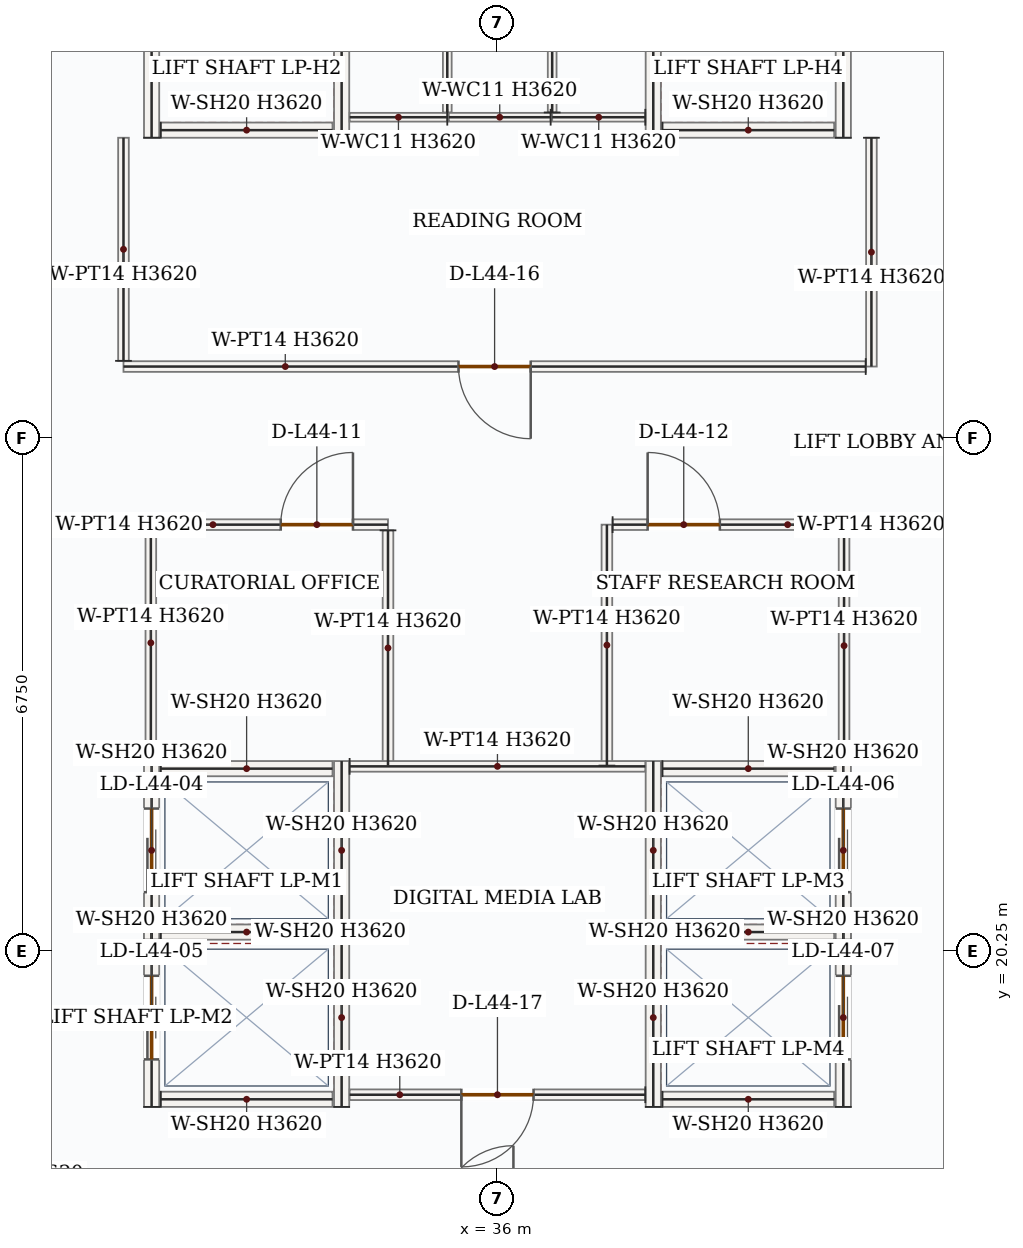
"""IFC4 building model, lengths in metres.
Left out: names, types, materials, properties, quantities, classifications, styles, units other than length and angle.
Written with IfcOpenShell. Run it as: python <this file> out.ifc"""

import sys

from ifc_helpers import new_model, si_unit, direction, frame, frame_2d, origin, place, context, subcontext, project, spatial, rectangle, extrude, source, transform, mapped, element, fill, save


model = new_model("IFC4")
c1 = context("Model", 3, precision=1e-05, world=origin(), true_north=direction((0.0, 1.0)))
c2 = subcontext(c1, "Body", "Model", "MODEL_VIEW")
j1 = project(units=[si_unit("LENGTHUNIT", "METRE"), si_unit("PLANEANGLEUNIT", "RADIAN")], contexts=[c1])
p1 = place(None, origin())
s1 = spatial("IfcSite", under=j1, at=p1, CompositionType="ELEMENT")
p2 = place(p1, origin())
s2 = spatial("IfcBuilding", under=s1, at=p2, CompositionType="ELEMENT")
p3 = place(p2, frame((0.0, 0.0, 190.2)))
s3 = spatial("IfcBuildingStorey", under=s2, at=p3, CompositionType="ELEMENT", Elevation=190.2)
m1 = source(origin(), c2, "Body", "SweptSolid", [
    extrude(rectangle(XDim=2.4, YDim=0.2, at=frame_2d((1.2, 0.0))), origin(), (0.0, 0.0, 1.0), 3.62),
])
for number, where, z_axis, x_axis in (
    (1, (31.45, 30.95, 0.0), (0.0, 0.0, 1.0), (0.0, 1.0, 0.0)),
    (2, (33.95, 30.95, 0.0), (0.0, 0.0, 1.0), (0.0, 1.0, 0.0)),
):
    element("IfcWall", number, at=place(p3, frame(where, z_axis=z_axis, x_axis=x_axis)), inside=s3, PredefinedType="SOLIDWALL", context=c2, shape_type="MappedRepresentation", body=[
        mapped(m1, transform((0.0, 0.0, 0.0), x_axis=(1.0, 0.0, 0.0), y_axis=(0.0, 1.0, 0.0), z_axis=(0.0, 0.0, 1.0), scale=1.0)),
    ])
m2 = source(origin(), c2, "Body", "SweptSolid", [
    extrude(rectangle(XDim=2.26, YDim=0.2, at=frame_2d((1.13, 0.0))), origin(), (0.0, 0.0, 1.0), 3.62),
])
p4 = place(p3, frame((31.57, 31.05, 0.0), z_axis=(0.0, 0.0, 1.0), x_axis=(1.0, 0.0, 0.0)))
e3 = element("IfcWall", 3, at=p4, inside=s3, PredefinedType="SOLIDWALL", context=c2, shape_type="MappedRepresentation", body=[
    mapped(m2, transform((0.0, 0.0, 0.0), x_axis=(1.0, 0.0, 0.0), y_axis=(0.0, 1.0, 0.0), z_axis=(0.0, 0.0, 1.0), scale=1.0)),
])
for number, where, z_axis, x_axis in (
    (4, (38.05, 30.95, 0.0), (0.0, 0.0, 1.0), (0.0, 1.0, 0.0)),
    (5, (40.55, 30.95, 0.0), (0.0, 0.0, 1.0), (0.0, 1.0, 0.0)),
):
    element("IfcWall", number, at=place(p3, frame(where, z_axis=z_axis, x_axis=x_axis)), inside=s3, PredefinedType="SOLIDWALL", context=c2, shape_type="MappedRepresentation", body=[
        mapped(m1, transform((0.0, 0.0, 0.0), x_axis=(1.0, 0.0, 0.0), y_axis=(0.0, 1.0, 0.0), z_axis=(0.0, 0.0, 1.0), scale=1.0)),
    ])
p5 = place(p3, frame((38.17, 31.05, 0.0), z_axis=(0.0, 0.0, 1.0), x_axis=(1.0, 0.0, 0.0)))
e6 = element("IfcWall", 6, at=p5, inside=s3, PredefinedType="SOLIDWALL", context=c2, shape_type="MappedRepresentation", body=[
    mapped(m2, transform((0.0, 0.0, 0.0), x_axis=(1.0, 0.0, 0.0), y_axis=(0.0, 1.0, 0.0), z_axis=(0.0, 0.0, 1.0), scale=1.0)),
])
p6 = place(p3, frame((31.45, 20.4, 0.0), z_axis=(0.0, 0.0, 1.0), x_axis=(0.0, 1.0, 0.0)))
e7 = element("IfcWall", 7, at=p6, inside=s3, PredefinedType="SOLIDWALL", context=c2, shape_type="SweptSolid", body=[
    extrude(rectangle(XDim=2.35, YDim=0.2, at=frame_2d((1.175, 0.0))), origin(), (0.0, 0.0, 1.0), 3.62),
])
p7 = place(p6, frame((0.625, 0.0, 0.0)))
e8 = element("IfcOpeningElement", 8, at=p7, cuts=e7, PredefinedType="OPENING", context=c2, shape_type="SweptSolid", body=[
    extrude(rectangle(XDim=1.1, YDim=2.15, at=frame_2d((0.55, 1.075))), frame((0.0, 0.11, 0.0), z_axis=(0.0, -1.0, 0.0), x_axis=(1.0, 0.0, 0.0)), (0.0, 0.0, 1.0), 0.22),
])
m3 = source(origin(), c2, "Body", "SweptSolid", [
    extrude(rectangle(XDim=2.35, YDim=0.2, at=frame_2d((1.175, 0.0))), origin(), (0.0, 0.0, 1.0), 3.62),
])
p8 = place(p3, frame((33.95, 20.4, 0.0), z_axis=(0.0, 0.0, 1.0), x_axis=(0.0, 1.0, 0.0)))
e9 = element("IfcWall", 9, at=p8, inside=s3, PredefinedType="SOLIDWALL", context=c2, shape_type="MappedRepresentation", body=[
    mapped(m3, transform((0.0, 0.0, 0.0), x_axis=(1.0, 0.0, 0.0), y_axis=(0.0, 1.0, 0.0), z_axis=(0.0, 0.0, 1.0), scale=1.0)),
])
for number, where, z_axis, x_axis in (
    (10, (31.57, 20.5, 0.0), (0.0, 0.0, 1.0), (1.0, 0.0, 0.0)),
    (11, (31.57, 22.65, 0.0), (0.0, 0.0, 1.0), (1.0, 0.0, 0.0)),
):
    element("IfcWall", number, at=place(p3, frame(where, z_axis=z_axis, x_axis=x_axis)), inside=s3, PredefinedType="SOLIDWALL", context=c2, shape_type="MappedRepresentation", body=[
        mapped(m2, transform((0.0, 0.0, 0.0), x_axis=(1.0, 0.0, 0.0), y_axis=(0.0, 1.0, 0.0), z_axis=(0.0, 0.0, 1.0), scale=1.0)),
    ])
p9 = place(p3, frame((31.45, 18.2, 0.0), z_axis=(0.0, 0.0, 1.0), x_axis=(0.0, 1.0, 0.0)))
e12 = element("IfcWall", 12, at=p9, inside=s3, PredefinedType="SOLIDWALL", context=c2, shape_type="SweptSolid", body=[
    extrude(rectangle(XDim=2.35, YDim=0.2, at=frame_2d((1.175, 0.0))), origin(), (0.0, 0.0, 1.0), 3.62),
])
p10 = place(p9, frame((0.625, 0.0, 0.0)))
e13 = element("IfcOpeningElement", 13, at=p10, cuts=e12, PredefinedType="OPENING", context=c2, shape_type="SweptSolid", body=[
    extrude(rectangle(XDim=1.1, YDim=2.15, at=frame_2d((0.55, 1.075))), frame((0.0, 0.11, 0.0), z_axis=(0.0, -1.0, 0.0), x_axis=(1.0, 0.0, 0.0)), (0.0, 0.0, 1.0), 0.22),
])
p11 = place(p3, frame((33.95, 18.2, 0.0), z_axis=(0.0, 0.0, 1.0), x_axis=(0.0, 1.0, 0.0)))
e14 = element("IfcWall", 14, at=p11, inside=s3, PredefinedType="SOLIDWALL", context=c2, shape_type="MappedRepresentation", body=[
    mapped(m3, transform((0.0, 0.0, 0.0), x_axis=(1.0, 0.0, 0.0), y_axis=(0.0, 1.0, 0.0), z_axis=(0.0, 0.0, 1.0), scale=1.0)),
])
p12 = place(p3, frame((31.57, 18.3, 0.0), z_axis=(0.0, 0.0, 1.0), x_axis=(1.0, 0.0, 0.0)))
e15 = element("IfcWall", 15, at=p12, inside=s3, PredefinedType="SOLIDWALL", context=c2, shape_type="MappedRepresentation", body=[
    mapped(m2, transform((0.0, 0.0, 0.0), x_axis=(1.0, 0.0, 0.0), y_axis=(0.0, 1.0, 0.0), z_axis=(0.0, 0.0, 1.0), scale=1.0)),
])
p13 = place(p3, frame((38.05, 20.4, 0.0), z_axis=(0.0, 0.0, 1.0), x_axis=(0.0, 1.0, 0.0)))
e16 = element("IfcWall", 16, at=p13, inside=s3, PredefinedType="SOLIDWALL", context=c2, shape_type="MappedRepresentation", body=[
    mapped(m3, transform((0.0, 0.0, 0.0), x_axis=(1.0, 0.0, 0.0), y_axis=(0.0, 1.0, 0.0), z_axis=(0.0, 0.0, 1.0), scale=1.0)),
])
p14 = place(p3, frame((40.55, 20.4, 0.0), z_axis=(0.0, 0.0, 1.0), x_axis=(0.0, 1.0, 0.0)))
e17 = element("IfcWall", 17, at=p14, inside=s3, PredefinedType="SOLIDWALL", context=c2, shape_type="SweptSolid", body=[
    extrude(rectangle(XDim=2.35, YDim=0.2, at=frame_2d((1.175, 0.0))), origin(), (0.0, 0.0, 1.0), 3.62),
])
p15 = place(p14, frame((0.625, 0.0, 0.0)))
e18 = element("IfcOpeningElement", 18, at=p15, cuts=e17, PredefinedType="OPENING", context=c2, shape_type="SweptSolid", body=[
    extrude(rectangle(XDim=1.1, YDim=2.15, at=frame_2d((0.55, 1.075))), frame((0.0, 0.11, 0.0), z_axis=(0.0, -1.0, 0.0), x_axis=(1.0, 0.0, 0.0)), (0.0, 0.0, 1.0), 0.22),
])
for number, where, z_axis, x_axis in (
    (19, (38.17, 20.5, 0.0), (0.0, 0.0, 1.0), (1.0, 0.0, 0.0)),
    (20, (38.17, 22.65, 0.0), (0.0, 0.0, 1.0), (1.0, 0.0, 0.0)),
):
    element("IfcWall", number, at=place(p3, frame(where, z_axis=z_axis, x_axis=x_axis)), inside=s3, PredefinedType="SOLIDWALL", context=c2, shape_type="MappedRepresentation", body=[
        mapped(m2, transform((0.0, 0.0, 0.0), x_axis=(1.0, 0.0, 0.0), y_axis=(0.0, 1.0, 0.0), z_axis=(0.0, 0.0, 1.0), scale=1.0)),
    ])
p16 = place(p3, frame((38.05, 18.2, 0.0), z_axis=(0.0, 0.0, 1.0), x_axis=(0.0, 1.0, 0.0)))
e21 = element("IfcWall", 21, at=p16, inside=s3, PredefinedType="SOLIDWALL", context=c2, shape_type="MappedRepresentation", body=[
    mapped(m3, transform((0.0, 0.0, 0.0), x_axis=(1.0, 0.0, 0.0), y_axis=(0.0, 1.0, 0.0), z_axis=(0.0, 0.0, 1.0), scale=1.0)),
])
p17 = place(p3, frame((40.55, 18.2, 0.0), z_axis=(0.0, 0.0, 1.0), x_axis=(0.0, 1.0, 0.0)))
e22 = element("IfcWall", 22, at=p17, inside=s3, PredefinedType="SOLIDWALL", context=c2, shape_type="SweptSolid", body=[
    extrude(rectangle(XDim=2.35, YDim=0.2, at=frame_2d((1.175, 0.0))), origin(), (0.0, 0.0, 1.0), 3.62),
])
p18 = place(p17, frame((0.625, 0.0, 0.0)))
e23 = element("IfcOpeningElement", 23, at=p18, cuts=e22, PredefinedType="OPENING", context=c2, shape_type="SweptSolid", body=[
    extrude(rectangle(XDim=1.1, YDim=2.15, at=frame_2d((0.55, 1.075))), frame((0.0, 0.11, 0.0), z_axis=(0.0, -1.0, 0.0), x_axis=(1.0, 0.0, 0.0)), (0.0, 0.0, 1.0), 0.22),
])
p19 = place(p3, frame((38.17, 18.3, 0.0), z_axis=(0.0, 0.0, 1.0), x_axis=(1.0, 0.0, 0.0)))
e24 = element("IfcWall", 24, at=p19, inside=s3, PredefinedType="SOLIDWALL", context=c2, shape_type="MappedRepresentation", body=[
    mapped(m2, transform((0.0, 0.0, 0.0), x_axis=(1.0, 0.0, 0.0), y_axis=(0.0, 1.0, 0.0), z_axis=(0.0, 0.0, 1.0), scale=1.0)),
])
m4 = source(origin(), c2, "Body", "SweptSolid", [
    extrude(rectangle(XDim=1.225, YDim=0.115, at=frame_2d((0.613, 0.0))), origin(), (0.0, 0.0, 1.0), 3.62),
])
p20 = place(p3, frame((37.945, 31.22, 0.0), z_axis=(0.0, 0.0, 1.0), x_axis=(-1.0, 0.0, 0.0)))
e25 = element("IfcWall", 25, at=p20, inside=s3, PredefinedType="PARTITIONING", context=c2, shape_type="MappedRepresentation", body=[
    mapped(m4, transform((0.0, 0.0, 0.0), x_axis=(1.0, 0.0, 0.0), y_axis=(0.0, 1.0, 0.0), z_axis=(0.0, 0.0, 1.0), scale=1.0)),
])
m5 = source(origin(), c2, "Body", "SweptSolid", [
    extrude(rectangle(XDim=3.998, YDim=0.115, at=frame_2d((1.999, 0.0))), origin(), (0.0, 0.0, 1.0), 3.62),
])
p21 = place(p3, frame((36.72, 31.282, 0.0), z_axis=(0.0, 0.0, 1.0), x_axis=(0.0, 1.0, 0.0)))
e26 = element("IfcWall", 26, at=p21, inside=s3, PredefinedType="PARTITIONING", context=c2, shape_type="MappedRepresentation", body=[
    mapped(m5, transform((0.0, 0.0, 0.0), x_axis=(1.0, 0.0, 0.0), y_axis=(0.0, 1.0, 0.0), z_axis=(0.0, 0.0, 1.0), scale=1.0)),
])
m6 = source(origin(), c2, "Body", "SweptSolid", [
    extrude(rectangle(XDim=1.285, YDim=0.115, at=frame_2d((0.643, 0.0))), origin(), (0.0, 0.0, 1.0), 3.62),
])
p22 = place(p3, frame((35.34, 31.22, 0.0), z_axis=(0.0, 0.0, 1.0), x_axis=(-1.0, 0.0, 0.0)))
e27 = element("IfcWall", 27, at=p22, inside=s3, PredefinedType="PARTITIONING", context=c2, shape_type="MappedRepresentation", body=[
    mapped(m6, transform((0.0, 0.0, 0.0), x_axis=(1.0, 0.0, 0.0), y_axis=(0.0, 1.0, 0.0), z_axis=(0.0, 0.0, 1.0), scale=1.0)),
])
m7 = source(origin(), c2, "Body", "SweptSolid", [
    extrude(rectangle(XDim=3.935, YDim=0.115, at=frame_2d((1.968, 0.0))), origin(), (0.0, 0.0, 1.0), 3.62),
])
p23 = place(p3, frame((35.34, 35.218, 0.0), z_axis=(0.0, 0.0, 1.0), x_axis=(0.0, -1.0, 0.0)))
e28 = element("IfcWall", 28, at=p23, inside=s3, PredefinedType="PARTITIONING", context=c2, shape_type="MappedRepresentation", body=[
    mapped(m7, transform((0.0, 0.0, 0.0), x_axis=(1.0, 0.0, 0.0), y_axis=(0.0, 1.0, 0.0), z_axis=(0.0, 0.0, 1.0), scale=1.0)),
])
m8 = source(origin(), c2, "Body", "SweptSolid", [
    extrude(rectangle(XDim=1.34, YDim=0.115, at=frame_2d((0.67, 0.0))), origin(), (0.0, 0.0, 1.0), 3.62),
])
p24 = place(p3, frame((36.7, 31.22, 0.0), z_axis=(0.0, 0.0, 1.0), x_axis=(-1.0, 0.0, 0.0)))
e29 = element("IfcWall", 29, at=p24, inside=s3, PredefinedType="PARTITIONING", context=c2, shape_type="MappedRepresentation", body=[
    mapped(m8, transform((0.0, 0.0, 0.0), x_axis=(1.0, 0.0, 0.0), y_axis=(0.0, 1.0, 0.0), z_axis=(0.0, 0.0, 1.0), scale=1.0)),
])
m9 = source(origin(), c2, "Body", "SweptSolid", [
    extrude(rectangle(XDim=3.11, YDim=0.14, at=frame_2d((1.555, 0.0))), origin(), (0.0, 0.0, 1.0), 3.62),
])
p25 = place(p3, frame((31.44, 22.75, 0.0), z_axis=(0.0, 0.0, 1.0), x_axis=(0.0, 1.0, 0.0)))
e30 = element("IfcWall", 30, at=p25, inside=s3, PredefinedType="PARTITIONING", context=c2, shape_type="MappedRepresentation", body=[
    mapped(m9, transform((0.0, 0.0, 0.0), x_axis=(1.0, 0.0, 0.0), y_axis=(0.0, 1.0, 0.0), z_axis=(0.0, 0.0, 1.0), scale=1.0)),
])
p26 = place(p3, frame((31.515, 25.86, 0.0), z_axis=(0.0, 0.0, 1.0), x_axis=(1.0, 0.0, 0.0)))
e31 = element("IfcWall", 31, at=p26, inside=s3, PredefinedType="PARTITIONING", context=c2, shape_type="SweptSolid", body=[
    extrude(rectangle(XDim=3.045, YDim=0.14, at=frame_2d((1.522, 0.0))), origin(), (0.0, 0.0, 1.0), 3.62),
])
p27 = place(p26, frame((1.634, 0.0, 0.0)))
e32 = element("IfcOpeningElement", 32, at=p27, cuts=e31, PredefinedType="OPENING", context=c2, shape_type="SweptSolid", body=[
    extrude(rectangle(XDim=0.95, YDim=2.15, at=frame_2d((0.475, 1.075))), frame((0.0, 0.08, 0.0), z_axis=(0.0, -1.0, 0.0), x_axis=(1.0, 0.0, 0.0)), (0.0, 0.0, 1.0), 0.16),
])
m10 = source(origin(), c2, "Body", "SweptSolid", [
    extrude(rectangle(XDim=3.095, YDim=0.14, at=frame_2d((1.547, 0.0))), origin(), (0.0, 0.0, 1.0), 3.62),
])
p28 = place(p3, frame((34.56, 25.785, 0.0), z_axis=(0.0, 0.0, 1.0), x_axis=(0.0, -1.0, 0.0)))
e33 = element("IfcWall", 33, at=p28, inside=s3, PredefinedType="PARTITIONING", context=c2, shape_type="MappedRepresentation", body=[
    mapped(m10, transform((0.0, 0.0, 0.0), x_axis=(1.0, 0.0, 0.0), y_axis=(0.0, 1.0, 0.0), z_axis=(0.0, 0.0, 1.0), scale=1.0)),
])
m11 = source(origin(), c2, "Body", "SweptSolid", [
    extrude(rectangle(XDim=3.17, YDim=0.14, at=frame_2d((1.585, 0.0))), origin(), (0.0, 0.0, 1.0), 3.62),
])
p29 = place(p3, frame((37.44, 22.69, 0.0), z_axis=(0.0, 0.0, 1.0), x_axis=(0.0, 1.0, 0.0)))
e34 = element("IfcWall", 34, at=p29, inside=s3, PredefinedType="PARTITIONING", context=c2, shape_type="MappedRepresentation", body=[
    mapped(m11, transform((0.0, 0.0, 0.0), x_axis=(1.0, 0.0, 0.0), y_axis=(0.0, 1.0, 0.0), z_axis=(0.0, 0.0, 1.0), scale=1.0)),
])
p30 = place(p3, frame((37.515, 25.86, 0.0), z_axis=(0.0, 0.0, 1.0), x_axis=(1.0, 0.0, 0.0)))
e35 = element("IfcWall", 35, at=p30, inside=s3, PredefinedType="PARTITIONING", context=c2, shape_type="SweptSolid", body=[
    extrude(rectangle(XDim=3.045, YDim=0.14, at=frame_2d((1.522, 0.0))), origin(), (0.0, 0.0, 1.0), 3.62),
])
p31 = place(p30, frame((0.461, 0.0, 0.0)))
e36 = element("IfcOpeningElement", 36, at=p31, cuts=e35, PredefinedType="OPENING", context=c2, shape_type="SweptSolid", body=[
    extrude(rectangle(XDim=0.95, YDim=2.15, at=frame_2d((0.475, 1.075))), frame((0.0, 0.08, 0.0), z_axis=(0.0, -1.0, 0.0), x_axis=(1.0, 0.0, 0.0)), (0.0, 0.0, 1.0), 0.16),
])
m12 = source(origin(), c2, "Body", "SweptSolid", [
    extrude(rectangle(XDim=3.035, YDim=0.14, at=frame_2d((1.518, 0.0))), origin(), (0.0, 0.0, 1.0), 3.62),
])
p32 = place(p3, frame((40.56, 25.785, 0.0), z_axis=(0.0, 0.0, 1.0), x_axis=(0.0, -1.0, 0.0)))
e37 = element("IfcWall", 37, at=p32, inside=s3, PredefinedType="PARTITIONING", context=c2, shape_type="MappedRepresentation", body=[
    mapped(m12, transform((0.0, 0.0, 0.0), x_axis=(1.0, 0.0, 0.0), y_axis=(0.0, 1.0, 0.0), z_axis=(0.0, 0.0, 1.0), scale=1.0)),
])
m13 = source(origin(), c2, "Body", "SweptSolid", [
    extrude(rectangle(XDim=3.89, YDim=0.14, at=frame_2d((1.945, 0.0))), origin(), (0.0, 0.0, 1.0), 3.62),
])
p33 = place(p3, frame((34.055, 22.68, 0.0), z_axis=(0.0, 0.0, 1.0), x_axis=(1.0, 0.0, 0.0)))
e38 = element("IfcWall", 38, at=p33, inside=s3, PredefinedType="PARTITIONING", context=c2, shape_type="MappedRepresentation", body=[
    mapped(m13, transform((0.0, 0.0, 0.0), x_axis=(1.0, 0.0, 0.0), y_axis=(0.0, 1.0, 0.0), z_axis=(0.0, 0.0, 1.0), scale=1.0)),
])
p34 = place(p3, frame((37.945, 18.36, 0.0), z_axis=(0.0, 0.0, 1.0), x_axis=(-1.0, 0.0, 0.0)))
e39 = element("IfcWall", 39, at=p34, inside=s3, PredefinedType="PARTITIONING", context=c2, shape_type="SweptSolid", body=[
    extrude(rectangle(XDim=3.89, YDim=0.14, at=frame_2d((1.945, 0.0))), origin(), (0.0, 0.0, 1.0), 3.62),
])
p35 = place(p34, frame((1.47, 0.0, 0.0)))
e40 = element("IfcOpeningElement", 40, at=p35, cuts=e39, PredefinedType="OPENING", context=c2, shape_type="SweptSolid", body=[
    extrude(rectangle(XDim=0.95, YDim=2.15, at=frame_2d((0.475, 1.075))), frame((0.0, 0.08, 0.0), z_axis=(0.0, -1.0, 0.0), x_axis=(1.0, 0.0, 0.0)), (0.0, 0.0, 1.0), 0.16),
])
m14 = source(origin(), c2, "Body", "SweptSolid", [
    extrude(rectangle(XDim=3.01, YDim=0.14, at=frame_2d((1.505, 0.0))), origin(), (0.0, 0.0, 1.0), 3.62),
])
p36 = place(p3, frame((40.92, 30.95, 0.0), z_axis=(0.0, 0.0, 1.0), x_axis=(0.0, -1.0, 0.0)))
e41 = element("IfcWall", 41, at=p36, inside=s3, PredefinedType="PARTITIONING", context=c2, shape_type="MappedRepresentation", body=[
    mapped(m14, transform((0.0, 0.0, 0.0), x_axis=(1.0, 0.0, 0.0), y_axis=(0.0, 1.0, 0.0), z_axis=(0.0, 0.0, 1.0), scale=1.0)),
])
p37 = place(p3, frame((40.845, 27.94, 0.0), z_axis=(0.0, 0.0, 1.0), x_axis=(-1.0, 0.0, 0.0)))
e42 = element("IfcWall", 42, at=p37, inside=s3, PredefinedType="PARTITIONING", context=c2, shape_type="SweptSolid", body=[
    extrude(rectangle(XDim=9.765, YDim=0.14, at=frame_2d((4.882, 0.0))), origin(), (0.0, 0.0, 1.0), 3.62),
])
p38 = place(p37, frame((4.407, 0.0, 0.0)))
e43 = element("IfcOpeningElement", 43, at=p38, cuts=e42, PredefinedType="OPENING", context=c2, shape_type="SweptSolid", body=[
    extrude(rectangle(XDim=0.95, YDim=2.15, at=frame_2d((0.475, 1.075))), frame((0.0, 0.08, 0.0), z_axis=(0.0, -1.0, 0.0), x_axis=(1.0, 0.0, 0.0)), (0.0, 0.0, 1.0), 0.16),
])
m15 = source(origin(), c2, "Body", "SweptSolid", [
    extrude(rectangle(XDim=2.935, YDim=0.14, at=frame_2d((1.468, 0.0))), origin(), (0.0, 0.0, 1.0), 3.62),
])
p39 = place(p3, frame((31.08, 28.015, 0.0), z_axis=(0.0, 0.0, 1.0), x_axis=(0.0, 1.0, 0.0)))
e44 = element("IfcWall", 44, at=p39, inside=s3, PredefinedType="PARTITIONING", context=c2, shape_type="MappedRepresentation", body=[
    mapped(m15, transform((0.0, 0.0, 0.0), x_axis=(1.0, 0.0, 0.0), y_axis=(0.0, 1.0, 0.0), z_axis=(0.0, 0.0, 1.0), scale=1.0)),
])
m16 = source(origin(), c2, "Body", "SweptSolid", [
    extrude(rectangle(XDim=1.1, YDim=2.15, at=frame_2d((0.55, 1.075))), frame((0.0, 0.025, 0.0), z_axis=(0.0, -1.0, 0.0), x_axis=(1.0, 0.0, 0.0)), (0.0, 0.0, 1.0), 0.05),
])
p40 = place(p7, origin())
e45 = element("IfcDoor", 45, at=p40, inside=s3, OperationType="DOUBLE_DOOR_SLIDING", PredefinedType="DOOR", context=c2, shape_type="MappedRepresentation", body=[
    mapped(m16, transform((0.0, 0.0, 0.0), x_axis=(1.0, 0.0, 0.0), y_axis=(0.0, 1.0, 0.0), z_axis=(0.0, 0.0, 1.0), scale=1.0)),
])
fill(e8, e45)
p41 = place(p10, origin())
e46 = element("IfcDoor", 46, at=p41, inside=s3, OperationType="DOUBLE_DOOR_SLIDING", PredefinedType="DOOR", context=c2, shape_type="MappedRepresentation", body=[
    mapped(m16, transform((0.0, 0.0, 0.0), x_axis=(1.0, 0.0, 0.0), y_axis=(0.0, 1.0, 0.0), z_axis=(0.0, 0.0, 1.0), scale=1.0)),
])
fill(e13, e46)
p42 = place(p15, origin())
e47 = element("IfcDoor", 47, at=p42, inside=s3, OperationType="DOUBLE_DOOR_SLIDING", PredefinedType="DOOR", context=c2, shape_type="MappedRepresentation", body=[
    mapped(m16, transform((0.0, 0.0, 0.0), x_axis=(1.0, 0.0, 0.0), y_axis=(0.0, 1.0, 0.0), z_axis=(0.0, 0.0, 1.0), scale=1.0)),
])
fill(e18, e47)
p43 = place(p18, origin())
e48 = element("IfcDoor", 48, at=p43, inside=s3, OperationType="DOUBLE_DOOR_SLIDING", PredefinedType="DOOR", context=c2, shape_type="MappedRepresentation", body=[
    mapped(m16, transform((0.0, 0.0, 0.0), x_axis=(1.0, 0.0, 0.0), y_axis=(0.0, 1.0, 0.0), z_axis=(0.0, 0.0, 1.0), scale=1.0)),
])
fill(e23, e48)
m17 = source(origin(), c2, "Body", "SweptSolid", [
    extrude(rectangle(XDim=0.95, YDim=2.15, at=frame_2d((0.475, 1.075))), frame((0.0, 0.025, 0.0), z_axis=(0.0, -1.0, 0.0), x_axis=(1.0, 0.0, 0.0)), (0.0, 0.0, 1.0), 0.05),
])
p44 = place(p27, origin())
e49 = element("IfcDoor", 49, at=p44, inside=s3, OperationType="SINGLE_SWING_RIGHT", PredefinedType="DOOR", context=c2, shape_type="MappedRepresentation", body=[
    mapped(m17, transform((0.0, 0.0, 0.0), x_axis=(1.0, 0.0, 0.0), y_axis=(0.0, 1.0, 0.0), z_axis=(0.0, 0.0, 1.0), scale=1.0)),
])
fill(e32, e49)
p45 = place(p31, origin())
e50 = element("IfcDoor", 50, at=p45, inside=s3, OperationType="SINGLE_SWING_LEFT", PredefinedType="DOOR", context=c2, shape_type="MappedRepresentation", body=[
    mapped(m17, transform((0.0, 0.0, 0.0), x_axis=(1.0, 0.0, 0.0), y_axis=(0.0, 1.0, 0.0), z_axis=(0.0, 0.0, 1.0), scale=1.0)),
])
fill(e36, e50)
p46 = place(p38, origin())
e51 = element("IfcDoor", 51, at=p46, inside=s3, OperationType="SINGLE_SWING_LEFT", PredefinedType="DOOR", context=c2, shape_type="MappedRepresentation", body=[
    mapped(m17, transform((0.0, 0.0, 0.0), x_axis=(1.0, 0.0, 0.0), y_axis=(0.0, 1.0, 0.0), z_axis=(0.0, 0.0, 1.0), scale=1.0)),
])
fill(e43, e51)
p47 = place(p35, origin())
e52 = element("IfcDoor", 52, at=p47, inside=s3, OperationType="SINGLE_SWING_RIGHT", PredefinedType="DOOR", context=c2, shape_type="MappedRepresentation", body=[
    mapped(m17, transform((0.0, 0.0, 0.0), x_axis=(1.0, 0.0, 0.0), y_axis=(0.0, 1.0, 0.0), z_axis=(0.0, 0.0, 1.0), scale=1.0)),
])
fill(e40, e52)
save(model, sys.argv[1])
